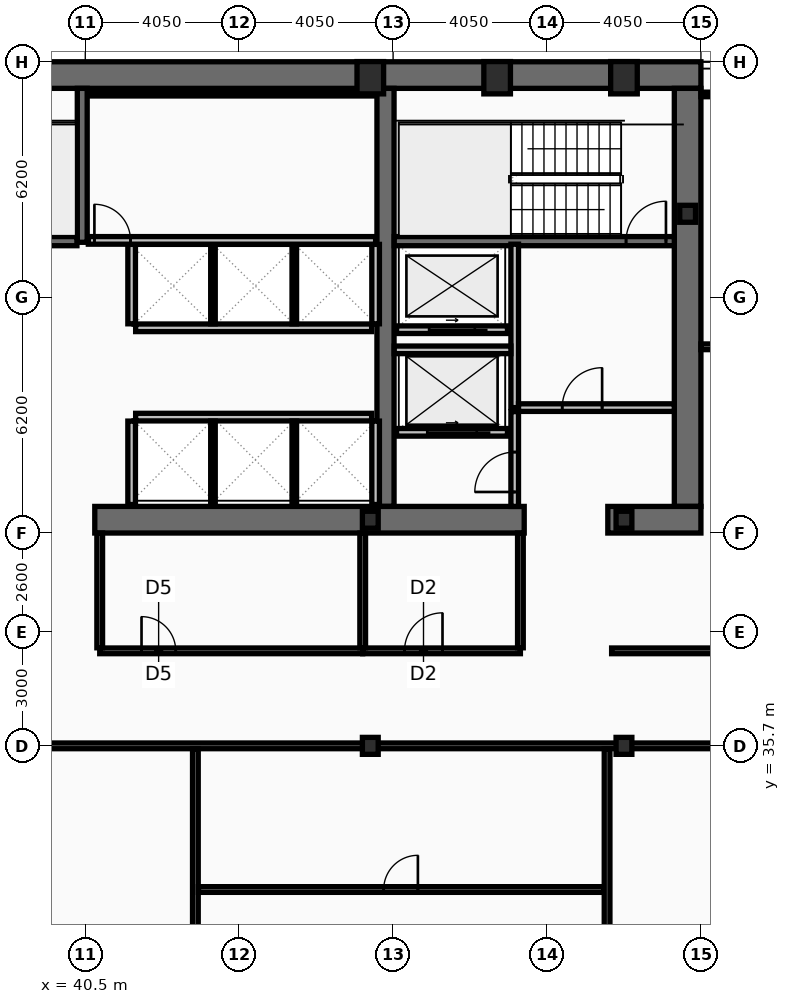
"""IFC4 building model, lengths in metres.
Left out: names, types, materials, properties, quantities, classifications, styles, units other than length and angle.
Written with IfcOpenShell. Run it as: python <this file> out.ifc"""

import sys

from ifc_helpers import new_model, si_unit, direction, frame, frame_2d, origin, origin_2d, place, context, subcontext, project, spatial, rectangle, hollow_rectangle, i_section, extrude, element, fill, save


model = new_model("IFC4")
c1 = context("Model", 3, precision=1e-05, world=origin(), true_north=direction((0.0, 1.0)))
c2 = subcontext(c1, "Body", "Model", "MODEL_VIEW")
j1 = project(units=[si_unit("LENGTHUNIT", "METRE"), si_unit("PLANEANGLEUNIT", "RADIAN")], contexts=[c1])
p1 = place(None, origin())
s1 = spatial("IfcSite", under=j1, at=p1, CompositionType="ELEMENT")
p2 = place(p1, origin())
s2 = spatial("IfcBuilding", under=s1, at=p2, CompositionType="ELEMENT")
p3 = place(p2, frame((0.0, 0.0, 139.8)))
s3 = spatial("IfcBuildingStorey", under=s2, at=p3, CompositionType="ELEMENT", Elevation=139.8)
p4 = place(p3, frame((16.2, 53.35, 0.0), z_axis=(0.0, 0.0, 1.0), x_axis=(1.0, 0.0, 0.0)))
e1 = element("IfcWall", 1, at=p4, inside=s3, PredefinedType="SHEAR", context=c2, shape_type="SweptSolid", body=[
    extrude(rectangle(XDim=40.5, YDim=0.7, at=frame_2d((20.25, 0.0))), origin(), (0.0, 0.0, 1.0), 3.44),
])
p5 = place(p3, frame((56.35, 53.0, 0.0), z_axis=(0.0, 0.0, 1.0), x_axis=(0.0, -1.0, 0.0)))
e2 = element("IfcWall", 2, at=p5, inside=s3, PredefinedType="SHEAR", context=c2, shape_type="SweptSolid", body=[
    extrude(rectangle(XDim=11.0, YDim=0.7, at=frame_2d((5.5, 0.0))), origin(), (0.0, 0.0, 1.0), 3.44),
])
p6 = place(p3, frame((48.4, 42.0, 0.0), z_axis=(0.0, 0.0, 1.0), x_axis=(0.0, 1.0, 0.0)))
e3 = element("IfcWall", 3, at=p6, inside=s3, PredefinedType="SHEAR", context=c2, shape_type="SweptSolid", body=[
    extrude(rectangle(XDim=11.0, YDim=0.45, at=frame_2d((5.5, 0.0))), origin(), (0.0, 0.0, 1.0), 3.44),
])
p7 = place(p3, frame((52.05, 41.65, 0.0), z_axis=(0.0, 0.0, 1.0), x_axis=(-1.0, 0.0, 0.0)))
e4 = element("IfcWall", 4, at=p7, inside=s3, PredefinedType="SHEAR", context=c2, shape_type="SweptSolid", body=[
    extrude(rectangle(XDim=11.3, YDim=0.7, at=frame_2d((5.65, 0.0))), origin(), (0.0, 0.0, 1.0), 3.44),
])
p8 = place(p3, frame((56.7, 41.65, 0.0), z_axis=(0.0, 0.0, 1.0), x_axis=(-1.0, 0.0, 0.0)))
e5 = element("IfcWall", 5, at=p8, inside=s3, PredefinedType="SHEAR", context=c2, shape_type="SweptSolid", body=[
    extrude(rectangle(XDim=2.45, YDim=0.7, at=frame_2d((1.225, 0.0))), origin(), (0.0, 0.0, 1.0), 3.44),
])
p9 = place(p3, frame((40.42, 48.95, 0.0), z_axis=(0.0, 0.0, 1.0), x_axis=(0.0, 1.0, 0.0)))
e6 = element("IfcWall", 6, at=p9, inside=s3, PredefinedType="SHEAR", context=c2, shape_type="SweptSolid", body=[
    extrude(rectangle(XDim=4.05, YDim=0.26, at=frame_2d((2.025, 0.0))), origin(), (0.0, 0.0, 1.0), 3.44),
])
p10 = place(p3, frame((48.63, 48.98, 0.0), z_axis=(0.0, 0.0, 1.0), x_axis=(1.0, 0.0, 0.0)))
e7 = element("IfcWall", 7, at=p10, inside=s3, PredefinedType="SHEAR", context=c2, shape_type="SweptSolid", body=[
    extrude(rectangle(XDim=7.37, YDim=0.24, at=frame_2d((3.685, 0.0))), origin(), (0.0, 0.0, 1.0), 3.44),
])
p11 = place(p10, frame((6.1, 0.0, 0.0)))
e8 = element("IfcOpeningElement", 8, at=p11, cuts=e7, PredefinedType="OPENING", context=c2, shape_type="SweptSolid", body=[
    extrude(rectangle(XDim=1.05, YDim=2.15, at=frame_2d((0.525, 1.075))), frame((0.0, 0.13, 0.0), z_axis=(0.0, -1.0, 0.0), x_axis=(1.0, 0.0, 0.0)), (0.0, 0.0, 1.0), 0.26),
])
p12 = place(p3, frame((32.72, 48.98, 0.0), z_axis=(0.0, 0.0, 1.0), x_axis=(1.0, 0.0, 0.0)))
e9 = element("IfcWall", 9, at=p12, inside=s3, PredefinedType="SHEAR", context=c2, shape_type="SweptSolid", body=[
    extrude(rectangle(XDim=7.56, YDim=0.24, at=frame_2d((3.78, 0.0))), origin(), (0.0, 0.0, 1.0), 3.44),
])
p13 = place(p12, frame((0.22, 0.0, 0.0)))
e10 = element("IfcOpeningElement", 10, at=p13, cuts=e9, PredefinedType="OPENING", context=c2, shape_type="SweptSolid", body=[
    extrude(rectangle(XDim=1.05, YDim=2.15, at=frame_2d((0.525, 1.075))), frame((0.0, 0.13, 0.0), z_axis=(0.0, -1.0, 0.0), x_axis=(1.0, 0.0, 0.0)), (0.0, 0.0, 1.0), 0.26),
])
for number, where, z_axis, x_axis in (
    (11, (48.0, 53.28, 0.0), (0.0, 0.0, 1.0), (1.0, 0.0, 0.0)),
    (12, (51.337, 53.28, 0.0), (0.0, 0.0, 1.0), (1.0, 0.0, 0.0)),
    (13, (54.675, 53.28, 0.0), (0.0, 0.0, 1.0), (1.0, 0.0, 0.0)),
):
    element("IfcColumn", number, at=place(p3, frame(where, z_axis=z_axis, x_axis=x_axis)), inside=s3, PredefinedType="COLUMN", context=c2, shape_type="SweptSolid", body=[
        extrude(hollow_rectangle(XDim=0.7, YDim=0.85, WallThickness=0.05, at=origin_2d()), origin(), (0.0, 0.0, 1.0), 3.6),
    ])
for number, where, z_axis, x_axis in (
    (14, (56.35, 49.7, 0.0), (0.0, 0.0, 1.0), (1.0, 0.0, 0.0)),
    (15, (48.0, 35.7, 0.0), (0.0, 0.0, 1.0), (1.0, 0.0, 0.0)),
    (16, (48.0, 41.65, 0.0), (0.0, 0.0, 1.0), (1.0, 0.0, 0.0)),
    (17, (54.675, 35.7, 0.0), (0.0, 0.0, 1.0), (1.0, 0.0, 0.0)),
    (18, (54.675, 41.65, 0.0), (0.0, 0.0, 1.0), (1.0, 0.0, 0.0)),
):
    element("IfcColumn", number, at=place(p3, frame(where, z_axis=z_axis, x_axis=x_axis)), inside=s3, PredefinedType="COLUMN", context=c2, shape_type="SweptSolid", body=[
        extrude(i_section(OverallWidth=0.416, OverallDepth=0.446, WebThickness=0.039, FlangeThickness=0.063, at=origin_2d()), origin(), (0.0, 0.0, 1.0), 3.6),
    ])
p14 = place(p3, frame((51.61, 43.95, 0.0), z_axis=(0.0, 0.0, 1.0), x_axis=(-1.0, 0.0, 0.0)))
e19 = element("IfcWall", 19, at=p14, inside=s3, PredefinedType="PARTITIONING", context=c2, shape_type="SweptSolid", body=[
    extrude(rectangle(XDim=2.92, YDim=0.2, at=frame_2d((1.46, 0.0))), origin(), (0.0, 0.0, 1.0), 3.44),
])
p15 = place(p14, frame((0.81, 0.0, 0.0)))
e20 = element("IfcOpeningElement", 20, at=p15, cuts=e19, PredefinedType="OPENING", context=c2, shape_type="SweptSolid", body=[
    extrude(rectangle(XDim=1.3, YDim=2.18, at=frame_2d((0.65, 1.09))), frame((0.0, 0.11, 0.0), z_axis=(0.0, -1.0, 0.0), x_axis=(1.0, 0.0, 0.0)), (0.0, 0.0, 1.0), 0.22),
])
p16 = place(p3, frame((51.61, 46.65, 0.0), z_axis=(0.0, 0.0, 1.0), x_axis=(-1.0, 0.0, 0.0)))
e21 = element("IfcWall", 21, at=p16, inside=s3, PredefinedType="PARTITIONING", context=c2, shape_type="SweptSolid", body=[
    extrude(rectangle(XDim=2.92, YDim=0.2, at=frame_2d((1.46, 0.0))), origin(), (0.0, 0.0, 1.0), 3.44),
])
p17 = place(p16, frame((0.86, 0.0, 0.0)))
e22 = element("IfcOpeningElement", 22, at=p17, cuts=e21, PredefinedType="OPENING", context=c2, shape_type="SweptSolid", body=[
    extrude(rectangle(XDim=1.2, YDim=2.18, at=frame_2d((0.6, 1.09))), frame((0.0, 0.11, 0.0), z_axis=(0.0, -1.0, 0.0), x_axis=(1.0, 0.0, 0.0)), (0.0, 0.0, 1.0), 0.22),
])
p18 = place(p3, frame((51.8, 44.6, 0.0), z_axis=(0.0, 0.0, 1.0), x_axis=(0.0, 1.0, 0.0)))
e23 = element("IfcWall", 23, at=p18, inside=s3, PredefinedType="PARTITIONING", context=c2, shape_type="SweptSolid", body=[
    extrude(rectangle(XDim=4.3, YDim=0.2, at=frame_2d((2.15, 0.0))), origin(), (0.0, 0.0, 1.0), 3.44),
])
p19 = place(p3, frame((51.9, 44.6, 0.0), z_axis=(0.0, 0.0, 1.0), x_axis=(1.0, 0.0, 0.0)))
e24 = element("IfcWall", 24, at=p19, inside=s3, PredefinedType="PARTITIONING", context=c2, shape_type="SweptSolid", body=[
    extrude(rectangle(XDim=4.1, YDim=0.2, at=frame_2d((2.05, 0.0))), origin(), (0.0, 0.0, 1.0), 3.44),
])
p20 = place(p19, frame((1.15, 0.0, 0.0)))
e25 = element("IfcOpeningElement", 25, at=p20, cuts=e24, PredefinedType="OPENING", context=c2, shape_type="SweptSolid", body=[
    extrude(rectangle(XDim=1.05, YDim=2.15, at=frame_2d((0.525, 1.075))), frame((0.0, 0.11, 0.0), z_axis=(0.0, -1.0, 0.0), x_axis=(1.0, 0.0, 0.0)), (0.0, 0.0, 1.0), 0.22),
])
p21 = place(p3, frame((48.63, 46.12, 0.0), z_axis=(0.0, 0.0, 1.0), x_axis=(1.0, 0.0, 0.0)))
e26 = element("IfcWall", 26, at=p21, inside=s3, PredefinedType="PARTITIONING", context=c2, shape_type="SweptSolid", body=[
    extrude(rectangle(XDim=3.07, YDim=0.2, at=frame_2d((1.535, 0.0))), origin(), (0.0, 0.0, 1.0), 3.44),
])
p22 = place(p3, frame((51.8, 42.0, 0.0), z_axis=(0.0, 0.0, 1.0), x_axis=(0.0, 1.0, 0.0)))
e27 = element("IfcWall", 27, at=p22, inside=s3, PredefinedType="PARTITIONING", context=c2, shape_type="SweptSolid", body=[
    extrude(rectangle(XDim=2.495, YDim=0.2, at=frame_2d((1.248, 0.0))), origin(), (0.0, 0.0, 1.0), 3.44),
])
p23 = place(p22, frame((0.38, 0.0, 0.0)))
e28 = element("IfcOpeningElement", 28, at=p23, cuts=e27, PredefinedType="OPENING", context=c2, shape_type="SweptSolid", body=[
    extrude(rectangle(XDim=1.05, YDim=2.15, at=frame_2d((0.525, 1.075))), frame((0.0, 0.11, 0.0), z_axis=(0.0, -1.0, 0.0), x_axis=(1.0, 0.0, 0.0)), (0.0, 0.0, 1.0), 0.22),
])
p24 = place(p3, frame((41.825, 46.7, 0.0), z_axis=(0.0, 0.0, 1.0), x_axis=(1.0, 0.0, 0.0)))
e29 = element("IfcWall", 29, at=p24, inside=s3, PredefinedType="PARTITIONING", context=c2, shape_type="SweptSolid", body=[
    extrude(rectangle(XDim=6.21, YDim=0.2, at=frame_2d((3.105, 0.0))), origin(), (0.0, 0.0, 1.0), 3.44),
])
for number, where, z_axis, x_axis in (
    (30, (41.72, 46.805, 0.0), (0.0, 0.0, 1.0), (0.0, 1.0, 0.0)),
    (31, (48.14, 46.805, 0.0), (0.0, 0.0, 1.0), (0.0, 1.0, 0.0)),
):
    element("IfcWall", number, at=place(p3, frame(where, z_axis=z_axis, x_axis=x_axis)), inside=s3, PredefinedType="PARTITIONING", context=c2, shape_type="SweptSolid", body=[
        extrude(rectangle(XDim=2.09, YDim=0.2, at=frame_2d((1.045, 0.0))), origin(), (0.0, 0.0, 1.0), 3.44),
    ])
for number, where, z_axis, x_axis in (
    (32, (43.86, 46.805, 0.0), (0.0, 0.0, 1.0), (0.0, 1.0, 0.0)),
    (33, (46.0, 46.805, 0.0), (0.0, 0.0, 1.0), (0.0, 1.0, 0.0)),
):
    element("IfcWall", number, at=place(p3, frame(where, z_axis=z_axis, x_axis=x_axis)), inside=s3, PredefinedType="PARTITIONING", context=c2, shape_type="SweptSolid", body=[
        extrude(rectangle(XDim=2.09, YDim=0.12, at=frame_2d((1.045, 0.0))), origin(), (0.0, 0.0, 1.0), 3.44),
    ])
p25 = place(p3, frame((41.825, 44.35, 0.0), z_axis=(0.0, 0.0, 1.0), x_axis=(1.0, 0.0, 0.0)))
e34 = element("IfcWall", 34, at=p25, inside=s3, PredefinedType="PARTITIONING", context=c2, shape_type="SweptSolid", body=[
    extrude(rectangle(XDim=6.21, YDim=0.2, at=frame_2d((3.105, 0.0))), origin(), (0.0, 0.0, 1.0), 3.44),
])
for number, where, z_axis, x_axis in (
    (35, (41.72, 42.05, 0.0), (0.0, 0.0, 1.0), (0.0, 1.0, 0.0)),
    (36, (48.14, 42.05, 0.0), (0.0, 0.0, 1.0), (0.0, 1.0, 0.0)),
):
    element("IfcWall", number, at=place(p3, frame(where, z_axis=z_axis, x_axis=x_axis)), inside=s3, PredefinedType="PARTITIONING", context=c2, shape_type="SweptSolid", body=[
        extrude(rectangle(XDim=2.195, YDim=0.2, at=frame_2d((1.098, 0.0))), origin(), (0.0, 0.0, 1.0), 3.44),
    ])
for number, where, z_axis, x_axis in (
    (37, (43.86, 42.05, 0.0), (0.0, 0.0, 1.0), (0.0, 1.0, 0.0)),
    (38, (46.0, 42.05, 0.0), (0.0, 0.0, 1.0), (0.0, 1.0, 0.0)),
):
    element("IfcWall", number, at=place(p3, frame(where, z_axis=z_axis, x_axis=x_axis)), inside=s3, PredefinedType="PARTITIONING", context=c2, shape_type="SweptSolid", body=[
        extrude(rectangle(XDim=2.195, YDim=0.12, at=frame_2d((1.098, 0.0))), origin(), (0.0, 0.0, 1.0), 3.44),
    ])
p26 = place(p3, frame((40.58, 52.86, 0.0), z_axis=(0.0, 0.0, 1.0), x_axis=(1.0, 0.0, 0.0)))
e39 = element("IfcWall", 39, at=p26, inside=s3, PredefinedType="PARTITIONING", context=c2, shape_type="SweptSolid", body=[
    extrude(rectangle(XDim=7.56, YDim=0.12, at=frame_2d((3.78, 0.0))), origin(), (0.0, 0.0, 1.0), 3.44),
])
p27 = place(p3, frame((40.58, 49.0, 0.0), z_axis=(0.0, 0.0, 1.0), x_axis=(1.0, 0.0, 0.0)))
e40 = element("IfcWall", 40, at=p27, inside=s3, PredefinedType="PARTITIONING", context=c2, shape_type="SweptSolid", body=[
    extrude(rectangle(XDim=7.56, YDim=0.2, at=frame_2d((3.78, 0.0))), origin(), (0.0, 0.0, 1.0), 3.44),
])
p28 = place(p27, frame((0.16, 0.0, 0.0)))
e41 = element("IfcOpeningElement", 41, at=p28, cuts=e40, PredefinedType="OPENING", context=c2, shape_type="SweptSolid", body=[
    extrude(rectangle(XDim=0.95, YDim=2.1, at=frame_2d((0.475, 1.05))), frame((0.0, 0.11, 0.0), z_axis=(0.0, -1.0, 0.0), x_axis=(1.0, 0.0, 0.0)), (0.0, 0.0, 1.0), 0.22),
])
p29 = place(p3, frame((40.88, 38.2, 0.0), z_axis=(0.0, 0.0, 1.0), x_axis=(1.0, 0.0, 0.0)))
e42 = element("IfcWall", 42, at=p29, inside=s3, PredefinedType="PARTITIONING", context=c2, shape_type="SweptSolid", body=[
    extrude(rectangle(XDim=6.92, YDim=0.15, at=frame_2d((3.46, 0.0))), origin(), (0.0, 0.0, 1.0), 2.73),
])
p30 = place(p29, frame((1.1, 0.0, 0.0)))
e43 = element("IfcOpeningElement", 43, at=p30, cuts=e42, PredefinedType="OPENING", context=c2, shape_type="SweptSolid", body=[
    extrude(rectangle(XDim=0.9, YDim=2.05, at=frame_2d((0.45, 1.025))), frame((0.0, 0.085, 0.0), z_axis=(0.0, -1.0, 0.0), x_axis=(1.0, 0.0, 0.0)), (0.0, 0.0, 1.0), 0.17),
])
p31 = place(p3, frame((47.8, 38.2, 0.0), z_axis=(0.0, 0.0, 1.0), x_axis=(1.0, 0.0, 0.0)))
e44 = element("IfcWall", 44, at=p31, inside=s3, PredefinedType="PARTITIONING", context=c2, shape_type="SweptSolid", body=[
    extrude(rectangle(XDim=4.15, YDim=0.15, at=frame_2d((2.075, 0.0))), origin(), (0.0, 0.0, 1.0), 2.73),
])
p32 = place(p31, frame((1.1, 0.0, 0.0)))
e45 = element("IfcOpeningElement", 45, at=p32, cuts=e44, PredefinedType="OPENING", context=c2, shape_type="SweptSolid", body=[
    extrude(rectangle(XDim=1.0, YDim=2.05, at=frame_2d((0.5, 1.025))), frame((0.0, 0.085, 0.0), z_axis=(0.0, -1.0, 0.0), x_axis=(1.0, 0.0, 0.0)), (0.0, 0.0, 1.0), 0.17),
])
p33 = place(p3, frame((40.88, 38.28, 0.0), z_axis=(0.0, 0.0, 1.0), x_axis=(0.0, 1.0, 0.0)))
e46 = element("IfcWall", 46, at=p33, inside=s3, PredefinedType="PARTITIONING", context=c2, shape_type="SweptSolid", body=[
    extrude(rectangle(XDim=3.02, YDim=0.15, at=frame_2d((1.51, 0.0))), origin(), (0.0, 0.0, 1.0), 3.44),
])
p34 = place(p3, frame((47.8, 38.28, 0.0), z_axis=(0.0, 0.0, 1.0), x_axis=(0.0, 1.0, 0.0)))
e47 = element("IfcWall", 47, at=p34, inside=s3, PredefinedType="PARTITIONING", context=c2, shape_type="SweptSolid", body=[
    extrude(rectangle(XDim=3.02, YDim=0.15, at=frame_2d((1.51, 0.0))), origin(), (0.0, 0.0, 1.0), 2.73),
])
p35 = place(p3, frame((51.95, 38.28, 0.0), z_axis=(0.0, 0.0, 1.0), x_axis=(0.0, 1.0, 0.0)))
e48 = element("IfcWall", 48, at=p35, inside=s3, PredefinedType="PARTITIONING", context=c2, shape_type="SweptSolid", body=[
    extrude(rectangle(XDim=3.02, YDim=0.15, at=frame_2d((1.51, 0.0))), origin(), (0.0, 0.0, 1.0), 3.44),
])
p36 = place(p3, frame((54.35, 38.2, 0.0), z_axis=(0.0, 0.0, 1.0), x_axis=(1.0, 0.0, 0.0)))
e49 = element("IfcWall", 49, at=p36, inside=s3, PredefinedType="PARTITIONING", context=c2, shape_type="SweptSolid", body=[
    extrude(rectangle(XDim=12.52, YDim=0.15, at=frame_2d((6.26, 0.0))), origin(), (0.0, 0.0, 1.0), 2.73),
])
p37 = place(p36, frame((3.25, 0.0, 0.0)))
e50 = element("IfcOpeningElement", 50, at=p37, cuts=e49, PredefinedType="OPENING", context=c2, shape_type="SweptSolid", body=[
    extrude(rectangle(XDim=0.95, YDim=2.05, at=frame_2d((0.475, 1.025))), frame((0.0, 0.085, 0.0), z_axis=(0.0, -1.0, 0.0), x_axis=(1.0, 0.0, 0.0)), (0.0, 0.0, 1.0), 0.17),
])
p38 = place(p3, frame((56.7, 46.2, 0.0), z_axis=(0.0, 0.0, 1.0), x_axis=(1.0, 0.0, 0.0)))
e51 = element("IfcWall", 51, at=p38, inside=s3, PredefinedType="PARTITIONING", context=c2, shape_type="SweptSolid", body=[
    extrude(rectangle(XDim=10.105, YDim=0.15, at=frame_2d((5.052, 0.0))), origin(), (0.0, 0.0, 1.0), 2.83),
])
p39 = place(p38, frame((0.9, 0.0, 0.0)))
e52 = element("IfcOpeningElement", 52, at=p39, cuts=e51, PredefinedType="OPENING", context=c2, shape_type="SweptSolid", body=[
    extrude(rectangle(XDim=0.9, YDim=2.05, at=frame_2d((0.45, 1.025))), frame((0.0, 0.085, 0.0), z_axis=(0.0, -1.0, 0.0), x_axis=(1.0, 0.0, 0.0)), (0.0, 0.0, 1.0), 0.17),
])
p40 = place(p3, frame((21.81, 35.7, 0.0), z_axis=(0.0, 0.0, 1.0), x_axis=(1.0, 0.0, 0.0)))
e53 = element("IfcWall", 53, at=p40, inside=s3, PredefinedType="PARTITIONING", context=c2, shape_type="SweptSolid", body=[
    extrude(rectangle(XDim=44.995, YDim=0.15, at=frame_2d((22.498, 0.0))), origin(), (0.0, 0.0, 1.0), 2.73),
])
p41 = place(p3, frame((43.397, 26.785, 0.0), z_axis=(0.0, 0.0, 1.0), x_axis=(0.0, 1.0, 0.0)))
e54 = element("IfcWall", 54, at=p41, inside=s3, PredefinedType="PARTITIONING", context=c2, shape_type="SweptSolid", body=[
    extrude(rectangle(XDim=8.835, YDim=0.15, at=frame_2d((4.417, 0.0))), origin(), (0.0, 0.0, 1.0), 2.93),
])
p42 = place(p3, frame((43.477, 31.92, 0.0), z_axis=(0.0, 0.0, 1.0), x_axis=(1.0, 0.0, 0.0)))
e55 = element("IfcWall", 55, at=p42, inside=s3, PredefinedType="PARTITIONING", context=c2, shape_type="SweptSolid", body=[
    extrude(rectangle(XDim=10.674, YDim=0.15, at=frame_2d((5.337, 0.0))), origin(), (0.0, 0.0, 1.0), 2.73),
])
p43 = place(p42, frame((4.875, 0.0, 0.0)))
e56 = element("IfcOpeningElement", 56, at=p43, cuts=e55, PredefinedType="OPENING", context=c2, shape_type="SweptSolid", body=[
    extrude(rectangle(XDim=0.9, YDim=2.05, at=frame_2d((0.45, 1.025))), frame((0.0, 0.085, 0.0), z_axis=(0.0, -1.0, 0.0), x_axis=(1.0, 0.0, 0.0)), (0.0, 0.0, 1.0), 0.17),
])
p44 = place(p3, frame((54.231, 26.785, 0.0), z_axis=(0.0, 0.0, 1.0), x_axis=(0.0, 1.0, 0.0)))
e57 = element("IfcWall", 57, at=p44, inside=s3, PredefinedType="PARTITIONING", context=c2, shape_type="SweptSolid", body=[
    extrude(rectangle(XDim=8.835, YDim=0.15, at=frame_2d((4.417, 0.0))), origin(), (0.0, 0.0, 1.0), 2.73),
])
p45 = place(p3, frame((56.7, 52.84, 0.0), z_axis=(0.0, 0.0, 1.0), x_axis=(1.0, 0.0, 0.0)))
e58 = element("IfcWall", 58, at=p45, inside=s3, PredefinedType="PARTITIONING", context=c2, shape_type="SweptSolid", body=[
    extrude(rectangle(XDim=10.105, YDim=0.12, at=frame_2d((5.052, 0.0))), origin(), (0.0, 0.0, 1.0), 3.44),
])
p46 = place(p11, origin())
e59 = element("IfcDoor", 59, at=p46, inside=s3, OperationType="SINGLE_SWING_RIGHT", PredefinedType="DOOR", context=c2, shape_type="SweptSolid", body=[
    extrude(rectangle(XDim=1.05, YDim=2.15, at=frame_2d((0.525, 1.075))), frame((0.0, 0.025, 0.0), z_axis=(0.0, -1.0, 0.0), x_axis=(1.0, 0.0, 0.0)), (0.0, 0.0, 1.0), 0.05),
])
fill(e8, e59)
p47 = place(p15, origin())
e60 = element("IfcDoor", 60, at=p47, inside=s3, OperationType="SLIDING_TO_LEFT", PredefinedType="DOOR", context=c2, shape_type="SweptSolid", body=[
    extrude(rectangle(XDim=1.3, YDim=2.18, at=frame_2d((0.65, 1.09))), frame((0.0, 0.025, 0.0), z_axis=(0.0, -1.0, 0.0), x_axis=(1.0, 0.0, 0.0)), (0.0, 0.0, 1.0), 0.05),
])
fill(e20, e60)
p48 = place(p17, origin())
e61 = element("IfcDoor", 61, at=p48, inside=s3, OperationType="SLIDING_TO_LEFT", PredefinedType="DOOR", context=c2, shape_type="SweptSolid", body=[
    extrude(rectangle(XDim=1.2, YDim=2.18, at=frame_2d((0.6, 1.09))), frame((0.0, 0.025, 0.0), z_axis=(0.0, -1.0, 0.0), x_axis=(1.0, 0.0, 0.0)), (0.0, 0.0, 1.0), 0.05),
])
fill(e22, e61)
p49 = place(p20, origin())
e62 = element("IfcDoor", 62, at=p49, inside=s3, OperationType="SINGLE_SWING_RIGHT", PredefinedType="DOOR", context=c2, shape_type="SweptSolid", body=[
    extrude(rectangle(XDim=1.05, YDim=2.15, at=frame_2d((0.525, 1.075))), frame((0.0, 0.025, 0.0), z_axis=(0.0, -1.0, 0.0), x_axis=(1.0, 0.0, 0.0)), (0.0, 0.0, 1.0), 0.05),
])
fill(e25, e62)
p50 = place(p23, origin())
e63 = element("IfcDoor", 63, at=p50, inside=s3, OperationType="SINGLE_SWING_LEFT", PredefinedType="DOOR", context=c2, shape_type="SweptSolid", body=[
    extrude(rectangle(XDim=1.05, YDim=2.15, at=frame_2d((0.525, 1.075))), frame((0.0, 0.025, 0.0), z_axis=(0.0, -1.0, 0.0), x_axis=(1.0, 0.0, 0.0)), (0.0, 0.0, 1.0), 0.05),
])
fill(e28, e63)
p51 = place(p28, origin())
e64 = element("IfcDoor", 64, at=p51, inside=s3, OperationType="SINGLE_SWING_LEFT", PredefinedType="DOOR", context=c2, shape_type="SweptSolid", body=[
    extrude(rectangle(XDim=0.95, YDim=2.1, at=frame_2d((0.475, 1.05))), frame((0.0, 0.025, 0.0), z_axis=(0.0, -1.0, 0.0), x_axis=(1.0, 0.0, 0.0)), (0.0, 0.0, 1.0), 0.05),
])
fill(e41, e64)
p52 = place(p30, origin())
e65 = element("IfcDoor", 65, at=p52, inside=s3, OperationType="SINGLE_SWING_LEFT", PredefinedType="DOOR", context=c2, shape_type="SweptSolid", body=[
    extrude(rectangle(XDim=0.9, YDim=2.05, at=frame_2d((0.45, 1.025))), frame((0.0, 0.025, 0.0), z_axis=(0.0, -1.0, 0.0), x_axis=(1.0, 0.0, 0.0)), (0.0, 0.0, 1.0), 0.05),
])
fill(e43, e65)
p53 = place(p32, origin())
e66 = element("IfcDoor", 66, at=p53, inside=s3, OperationType="SINGLE_SWING_RIGHT", PredefinedType="DOOR", context=c2, shape_type="SweptSolid", body=[
    extrude(rectangle(XDim=1.0, YDim=2.05, at=frame_2d((0.5, 1.025))), frame((0.0, 0.025, 0.0), z_axis=(0.0, -1.0, 0.0), x_axis=(1.0, 0.0, 0.0)), (0.0, 0.0, 1.0), 0.05),
])
fill(e45, e66)
p54 = place(p43, origin())
e67 = element("IfcDoor", 67, at=p54, inside=s3, OperationType="SINGLE_SWING_RIGHT", PredefinedType="DOOR", context=c2, shape_type="SweptSolid", body=[
    extrude(rectangle(XDim=0.9, YDim=2.05, at=frame_2d((0.45, 1.025))), frame((0.0, 0.025, 0.0), z_axis=(0.0, -1.0, 0.0), x_axis=(1.0, 0.0, 0.0)), (0.0, 0.0, 1.0), 0.05),
])
fill(e56, e67)
save(model, sys.argv[1])
